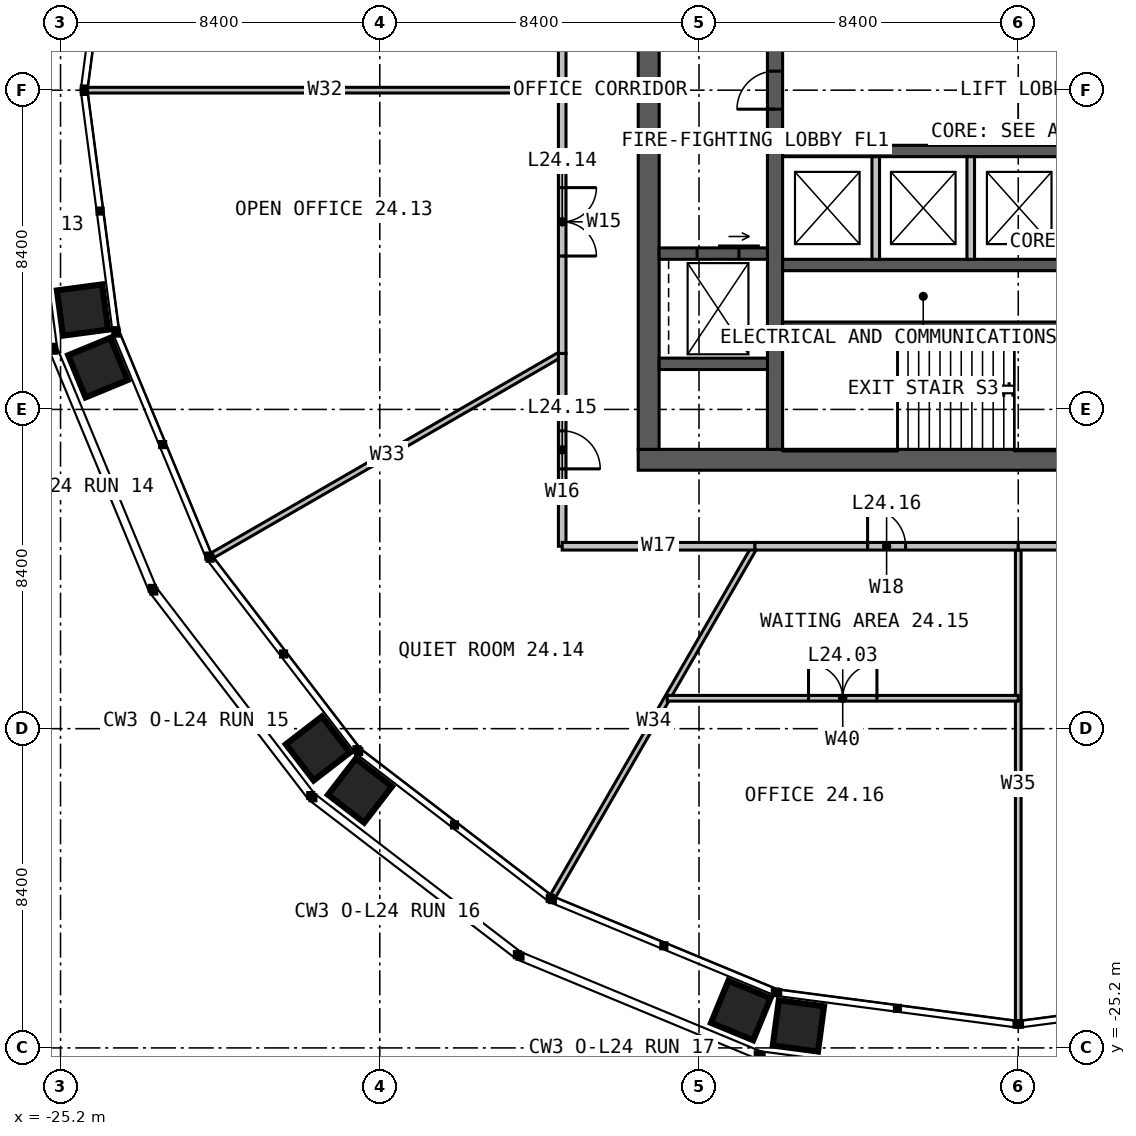
"""IFC4 building model, lengths in metres.
Left out: names, types, materials, properties, quantities, classifications, styles, units other than length and angle.
Written with IfcOpenShell. Run it as: python <this file> out.ifc"""

import sys

from ifc_helpers import new_model, si_unit, direction, frame, frame_2d, origin, place, context, subcontext, project, spatial, rectangle, extrude, element, fill, save


model = new_model("IFC4")
c1 = context("Model", 3, precision=1e-05, world=origin(), true_north=direction((0.0, 1.0)))
c2 = subcontext(c1, "Body", "Model", "MODEL_VIEW")
j1 = project(units=[si_unit("LENGTHUNIT", "METRE"), si_unit("PLANEANGLEUNIT", "RADIAN")], contexts=[c1])
p1 = place(None, origin())
s1 = spatial("IfcSite", under=j1, at=p1, CompositionType="ELEMENT")
p2 = place(p1, origin())
s2 = spatial("IfcBuilding", under=s1, at=p2, CompositionType="ELEMENT")
p3 = place(p2, frame((0.0, 0.0, 102.0)))
s3 = spatial("IfcBuildingStorey", under=s2, at=p3, CompositionType="ELEMENT", Elevation=102.0)
p4 = place(p3, frame((10.0, -9.725, 0.0), z_axis=(0.0, 0.0, 1.0), x_axis=(-1.0, 0.0, 0.0)))
e1 = element("IfcWall", 1, at=p4, inside=s3, PredefinedType="SOLIDWALL", context=c2, shape_type="SweptSolid", body=[
    extrude(rectangle(XDim=20.0, YDim=0.55, at=frame_2d((10.0, 0.0))), origin(), (0.0, 0.0, 1.0), 4.0),
])
p5 = place(p4, frame((6.875, 0.0, 0.0)))
e2 = element("IfcOpeningElement", 2, at=p5, cuts=e1, PredefinedType="OPENING", context=c2, shape_type="SweptSolid", body=[
    extrude(rectangle(XDim=1.2, YDim=2.2, at=frame_2d((0.6, 1.1))), frame((0.0, 0.285, 0.0), z_axis=(0.0, -1.0, 0.0), x_axis=(1.0, 0.0, 0.0)), (0.0, 0.0, 1.0), 0.57),
])
p6 = place(p3, frame((-9.725, 9.45, 0.0), z_axis=(0.0, 0.0, 1.0), x_axis=(0.0, -1.0, 0.0)))
e3 = element("IfcWall", 3, at=p6, inside=s3, PredefinedType="SOLIDWALL", context=c2, shape_type="SweptSolid", body=[
    extrude(rectangle(XDim=18.9, YDim=0.55, at=frame_2d((9.45, 0.0))), origin(), (0.0, 0.0, 1.0), 4.0),
])
p7 = place(p3, frame((-6.4, -9.45, 0.0), z_axis=(0.0, 0.0, 1.0), x_axis=(0.0, 1.0, 0.0)))
e4 = element("IfcWall", 4, at=p7, inside=s3, PredefinedType="SOLIDWALL", context=c2, shape_type="SweptSolid", body=[
    extrude(rectangle(XDim=18.9, YDim=0.4, at=frame_2d((9.45, 0.0))), origin(), (0.0, 0.0, 1.0), 4.0),
])
p8 = place(p7, frame((8.95, 0.0, 0.0)))
e5 = element("IfcOpeningElement", 5, at=p8, cuts=e4, PredefinedType="OPENING", context=c2, shape_type="SweptSolid", body=[
    extrude(rectangle(XDim=1.0, YDim=2.2, at=frame_2d((0.5, 1.1))), frame((0.0, 0.21, 0.0), z_axis=(0.0, -1.0, 0.0), x_axis=(1.0, 0.0, 0.0)), (0.0, 0.0, 1.0), 0.42),
])
for number, where, z_axis, x_axis in (
    (6, (-6.2, -1.6, 0.0), (0.0, 0.0, 1.0), (1.0, 0.0, 0.0)),
    (7, (-6.2, -4.6, 0.0), (0.0, 0.0, 1.0), (1.0, 0.0, 0.0)),
):
    element("IfcWall", number, at=place(p3, frame(where, z_axis=z_axis, x_axis=x_axis)), inside=s3, PredefinedType="SOLIDWALL", context=c2, shape_type="SweptSolid", body=[
        extrude(rectangle(XDim=7.4, YDim=0.3, at=frame_2d((3.7, 0.0))), origin(), (0.0, 0.0, 1.0), 4.0),
    ])
p9 = place(p3, frame((-6.2, -6.2, 0.0), z_axis=(0.0, 0.0, 1.0), x_axis=(1.0, 0.0, 0.0)))
e8 = element("IfcWall", 8, at=p9, inside=s3, PredefinedType="SOLIDWALL", context=c2, shape_type="SweptSolid", body=[
    extrude(rectangle(XDim=7.4, YDim=0.2, at=frame_2d((3.7, 0.0))), origin(), (0.0, 0.0, 1.0), 4.0),
])
p10 = place(p3, frame((-9.45, -4.3, 0.0), z_axis=(0.0, 0.0, 1.0), x_axis=(1.0, 0.0, 0.0)))
e9 = element("IfcWall", 9, at=p10, inside=s3, PredefinedType="SOLIDWALL", context=c2, shape_type="SweptSolid", body=[
    extrude(rectangle(XDim=2.85, YDim=0.3, at=frame_2d((1.425, 0.0))), origin(), (0.0, 0.0, 1.0), 4.0),
])
p11 = place(p10, frame((1.0, 0.0, 0.0)))
e10 = element("IfcOpeningElement", 10, at=p11, cuts=e9, PredefinedType="OPENING", context=c2, shape_type="SweptSolid", body=[
    extrude(rectangle(XDim=1.1, YDim=2.2, at=frame_2d((0.55, 1.1))), frame((0.0, 0.16, 0.0), z_axis=(0.0, -1.0, 0.0), x_axis=(1.0, 0.0, 0.0)), (0.0, 0.0, 1.0), 0.32),
])
p12 = place(p3, frame((-9.45, -7.2, 0.0), z_axis=(0.0, 0.0, 1.0), x_axis=(1.0, 0.0, 0.0)))
e11 = element("IfcWall", 11, at=p12, inside=s3, PredefinedType="SOLIDWALL", context=c2, shape_type="SweptSolid", body=[
    extrude(rectangle(XDim=2.85, YDim=0.3, at=frame_2d((1.425, 0.0))), origin(), (0.0, 0.0, 1.0), 4.0),
])
for number, where, z_axis, x_axis in (
    (12, (-3.75, -1.75, 0.0), (0.0, 0.0, 1.0), (0.0, -1.0, 0.0)),
    (13, (-1.25, -1.75, 0.0), (0.0, 0.0, 1.0), (0.0, -1.0, 0.0)),
):
    element("IfcWall", number, at=place(p3, frame(where, z_axis=z_axis, x_axis=x_axis)), inside=s3, PredefinedType="SOLIDWALL", context=c2, shape_type="SweptSolid", body=[
        extrude(rectangle(XDim=2.7, YDim=0.2, at=frame_2d((1.35, 0.0))), origin(), (0.0, 0.0, 1.0), 3.75),
    ])
p13 = place(p3, frame((-12.0, 0.0, 0.0), z_axis=(0.0, 0.0, 1.0), x_axis=(-1.0, 0.0, 0.0)))
e14 = element("IfcWall", 14, at=p13, inside=s3, PredefinedType="PARTITIONING", context=c2, shape_type="SweptSolid", body=[
    extrude(rectangle(XDim=12.487, YDim=0.15, at=frame_2d((6.244, 0.0))), origin(), (0.0, 0.0, 1.0), 2.79),
])
for number, where, z_axis, x_axis in (
    (15, (-12.0, -6.928, 0.0), (0.0, 0.0, 1.0), (-0.866, -0.5, 0.0)),
    (16, (-6.928, -12.0, 0.0), (0.0, 0.0, 1.0), (-0.5, -0.866, 0.0)),
):
    element("IfcWall", number, at=place(p3, frame(where, z_axis=z_axis, x_axis=x_axis)), inside=s3, PredefinedType="PARTITIONING", context=c2, shape_type="SweptSolid", body=[
        extrude(rectangle(XDim=10.631, YDim=0.15, at=frame_2d((5.315, 0.0))), origin(), (0.0, 0.0, 1.0), 2.79),
    ])
p14 = place(p3, frame((0.0, -12.0, 0.0), z_axis=(0.0, 0.0, 1.0), x_axis=(0.0, -1.0, 0.0)))
e17 = element("IfcWall", 17, at=p14, inside=s3, PredefinedType="PARTITIONING", context=c2, shape_type="SweptSolid", body=[
    extrude(rectangle(XDim=12.487, YDim=0.15, at=frame_2d((6.244, 0.0))), origin(), (0.0, 0.0, 1.0), 2.79),
])
p15 = place(p3, frame((-12.0, 6.928, 0.0), z_axis=(0.0, 0.0, 1.0), x_axis=(0.0, -1.0, 0.0)))
e18 = element("IfcWall", 18, at=p15, inside=s3, PredefinedType="PARTITIONING", context=c2, shape_type="SweptSolid", body=[
    extrude(rectangle(XDim=6.928, YDim=0.2, at=frame_2d((3.464, 0.0))), origin(), (0.0, 0.0, 1.0), 3.8),
])
p16 = place(p15, frame((2.564, 0.0, 0.0)))
e19 = element("IfcOpeningElement", 19, at=p16, cuts=e18, PredefinedType="OPENING", context=c2, shape_type="SweptSolid", body=[
    extrude(rectangle(XDim=1.8, YDim=2.2, at=frame_2d((0.9, 1.1))), frame((0.0, 0.11, 0.0), z_axis=(0.0, -1.0, 0.0), x_axis=(1.0, 0.0, 0.0)), (0.0, 0.0, 1.0), 0.22),
])
p17 = place(p3, frame((-12.0, 0.0, 0.0), z_axis=(0.0, 0.0, 1.0), x_axis=(0.0, -1.0, 0.0)))
e20 = element("IfcWall", 20, at=p17, inside=s3, PredefinedType="PARTITIONING", context=c2, shape_type="SweptSolid", body=[
    extrude(rectangle(XDim=6.928, YDim=0.2, at=frame_2d((3.464, 0.0))), origin(), (0.0, 0.0, 1.0), 3.8),
])
p18 = place(p17, frame((2.564, 0.0, 0.0)))
e21 = element("IfcOpeningElement", 21, at=p18, cuts=e20, PredefinedType="OPENING", context=c2, shape_type="SweptSolid", body=[
    extrude(rectangle(XDim=1.8, YDim=2.2, at=frame_2d((0.9, 1.1))), frame((0.0, 0.11, 0.0), z_axis=(0.0, -1.0, 0.0), x_axis=(1.0, 0.0, 0.0)), (0.0, 0.0, 1.0), 0.22),
])
p19 = place(p3, frame((-12.0, -6.928, 0.0), z_axis=(0.0, 0.0, 1.0), x_axis=(0.0, -1.0, 0.0)))
e22 = element("IfcWall", 22, at=p19, inside=s3, PredefinedType="PARTITIONING", context=c2, shape_type="SweptSolid", body=[
    extrude(rectangle(XDim=5.072, YDim=0.2, at=frame_2d((2.536, 0.0))), origin(), (0.0, 0.0, 1.0), 3.8),
])
p20 = place(p19, frame((2.036, 0.0, 0.0)))
e23 = element("IfcOpeningElement", 23, at=p20, cuts=e22, PredefinedType="OPENING", context=c2, shape_type="SweptSolid", body=[
    extrude(rectangle(XDim=1.0, YDim=2.2, at=frame_2d((0.5, 1.1))), frame((0.0, 0.11, 0.0), z_axis=(0.0, -1.0, 0.0), x_axis=(1.0, 0.0, 0.0)), (0.0, 0.0, 1.0), 0.22),
])
p21 = place(p3, frame((-12.0, -12.0, 0.0), z_axis=(0.0, 0.0, 1.0), x_axis=(1.0, 0.0, 0.0)))
e24 = element("IfcWall", 24, at=p21, inside=s3, PredefinedType="PARTITIONING", context=c2, shape_type="SweptSolid", body=[
    extrude(rectangle(XDim=5.072, YDim=0.2, at=frame_2d((2.536, 0.0))), origin(), (0.0, 0.0, 1.0), 3.8),
])
p22 = place(p3, frame((-9.238, -16.0, 0.0), z_axis=(0.0, 0.0, 1.0), x_axis=(1.0, 0.0, 0.0)))
e25 = element("IfcWall", 25, at=p22, inside=s3, PredefinedType="PARTITIONING", context=c2, shape_type="SweptSolid", body=[
    extrude(rectangle(XDim=9.238, YDim=0.15, at=frame_2d((4.619, 0.0))), origin(), (0.0, 0.0, 1.0), 2.79),
])
p23 = place(p22, frame((3.719, 0.0, 0.0)))
e26 = element("IfcOpeningElement", 26, at=p23, cuts=e25, PredefinedType="OPENING", context=c2, shape_type="SweptSolid", body=[
    extrude(rectangle(XDim=1.8, YDim=2.2, at=frame_2d((0.9, 1.1))), frame((0.0, 0.085, 0.0), z_axis=(0.0, -1.0, 0.0), x_axis=(1.0, 0.0, 0.0)), (0.0, 0.0, 1.0), 0.17),
])
p24 = place(p3, frame((-6.928, -12.0, 0.0), z_axis=(0.0, 0.0, 1.0), x_axis=(1.0, 0.0, 0.0)))
e27 = element("IfcWall", 27, at=p24, inside=s3, PredefinedType="PARTITIONING", context=c2, shape_type="SweptSolid", body=[
    extrude(rectangle(XDim=6.928, YDim=0.2, at=frame_2d((3.464, 0.0))), origin(), (0.0, 0.0, 1.0), 3.8),
])
p25 = place(p24, frame((2.964, 0.0, 0.0)))
e28 = element("IfcOpeningElement", 28, at=p25, cuts=e27, PredefinedType="OPENING", context=c2, shape_type="SweptSolid", body=[
    extrude(rectangle(XDim=1.0, YDim=2.2, at=frame_2d((0.5, 1.1))), frame((0.0, 0.11, 0.0), z_axis=(0.0, -1.0, 0.0), x_axis=(1.0, 0.0, 0.0)), (0.0, 0.0, 1.0), 0.22),
])
p26 = place(p3, frame((0.0, -12.0, 0.0), z_axis=(0.0, 0.0, 1.0), x_axis=(1.0, 0.0, 0.0)))
e29 = element("IfcWall", 29, at=p26, inside=s3, PredefinedType="PARTITIONING", context=c2, shape_type="SweptSolid", body=[
    extrude(rectangle(XDim=6.928, YDim=0.2, at=frame_2d((3.464, 0.0))), origin(), (0.0, 0.0, 1.0), 3.8),
])
p27 = place(p26, frame((2.564, 0.0, 0.0)))
e30 = element("IfcOpeningElement", 30, at=p27, cuts=e29, PredefinedType="OPENING", context=c2, shape_type="SweptSolid", body=[
    extrude(rectangle(XDim=1.8, YDim=2.2, at=frame_2d((0.9, 1.1))), frame((0.0, 0.11, 0.0), z_axis=(0.0, -1.0, 0.0), x_axis=(1.0, 0.0, 0.0)), (0.0, 0.0, 1.0), 0.22),
])
p28 = place(p8, origin())
e31 = element("IfcDoor", 31, at=p28, inside=s3, OperationType="SINGLE_SWING_LEFT", PredefinedType="DOOR", context=c2, shape_type="SweptSolid", body=[
    extrude(rectangle(XDim=1.0, YDim=2.2, at=frame_2d((0.5, 1.1))), frame((0.0, 0.025, 0.0), z_axis=(0.0, -1.0, 0.0), x_axis=(1.0, 0.0, 0.0)), (0.0, 0.0, 1.0), 0.05),
])
fill(e5, e31)
p29 = place(p11, origin())
e32 = element("IfcDoor", 32, at=p29, inside=s3, OperationType="SLIDING_TO_LEFT", PredefinedType="DOOR", context=c2, shape_type="SweptSolid", body=[
    extrude(rectangle(XDim=1.1, YDim=2.2, at=frame_2d((0.55, 1.1))), frame((0.0, 0.025, 0.0), z_axis=(0.0, -1.0, 0.0), x_axis=(1.0, 0.0, 0.0)), (0.0, 0.0, 1.0), 0.05),
])
fill(e10, e32)
p30 = place(p18, origin())
e33 = element("IfcDoor", 33, at=p30, inside=s3, OperationType="DOUBLE_DOOR_SINGLE_SWING", PredefinedType="DOOR", context=c2, shape_type="SweptSolid", body=[
    extrude(rectangle(XDim=1.8, YDim=2.2, at=frame_2d((0.9, 1.1))), frame((0.0, 0.025, 0.0), z_axis=(0.0, -1.0, 0.0), x_axis=(1.0, 0.0, 0.0)), (0.0, 0.0, 1.0), 0.05),
])
fill(e21, e33)
p31 = place(p20, origin())
e34 = element("IfcDoor", 34, at=p31, inside=s3, OperationType="SINGLE_SWING_RIGHT", PredefinedType="DOOR", context=c2, shape_type="SweptSolid", body=[
    extrude(rectangle(XDim=1.0, YDim=2.2, at=frame_2d((0.5, 1.1))), frame((0.0, 0.025, 0.0), z_axis=(0.0, -1.0, 0.0), x_axis=(1.0, 0.0, 0.0)), (0.0, 0.0, 1.0), 0.05),
])
fill(e23, e34)
p32 = place(p23, origin())
e35 = element("IfcDoor", 35, at=p32, inside=s3, OperationType="DOUBLE_DOOR_SINGLE_SWING", PredefinedType="DOOR", context=c2, shape_type="SweptSolid", body=[
    extrude(rectangle(XDim=1.8, YDim=2.2, at=frame_2d((0.9, 1.1))), frame((0.0, 0.025, 0.0), z_axis=(0.0, -1.0, 0.0), x_axis=(1.0, 0.0, 0.0)), (0.0, 0.0, 1.0), 0.05),
])
fill(e26, e35)
p33 = place(p25, origin())
e36 = element("IfcDoor", 36, at=p33, inside=s3, OperationType="SINGLE_SWING_LEFT", PredefinedType="DOOR", context=c2, shape_type="SweptSolid", body=[
    extrude(rectangle(XDim=1.0, YDim=2.2, at=frame_2d((0.5, 1.1))), frame((0.0, 0.025, 0.0), z_axis=(0.0, -1.0, 0.0), x_axis=(1.0, 0.0, 0.0)), (0.0, 0.0, 1.0), 0.05),
])
fill(e28, e36)
save(model, sys.argv[1])
